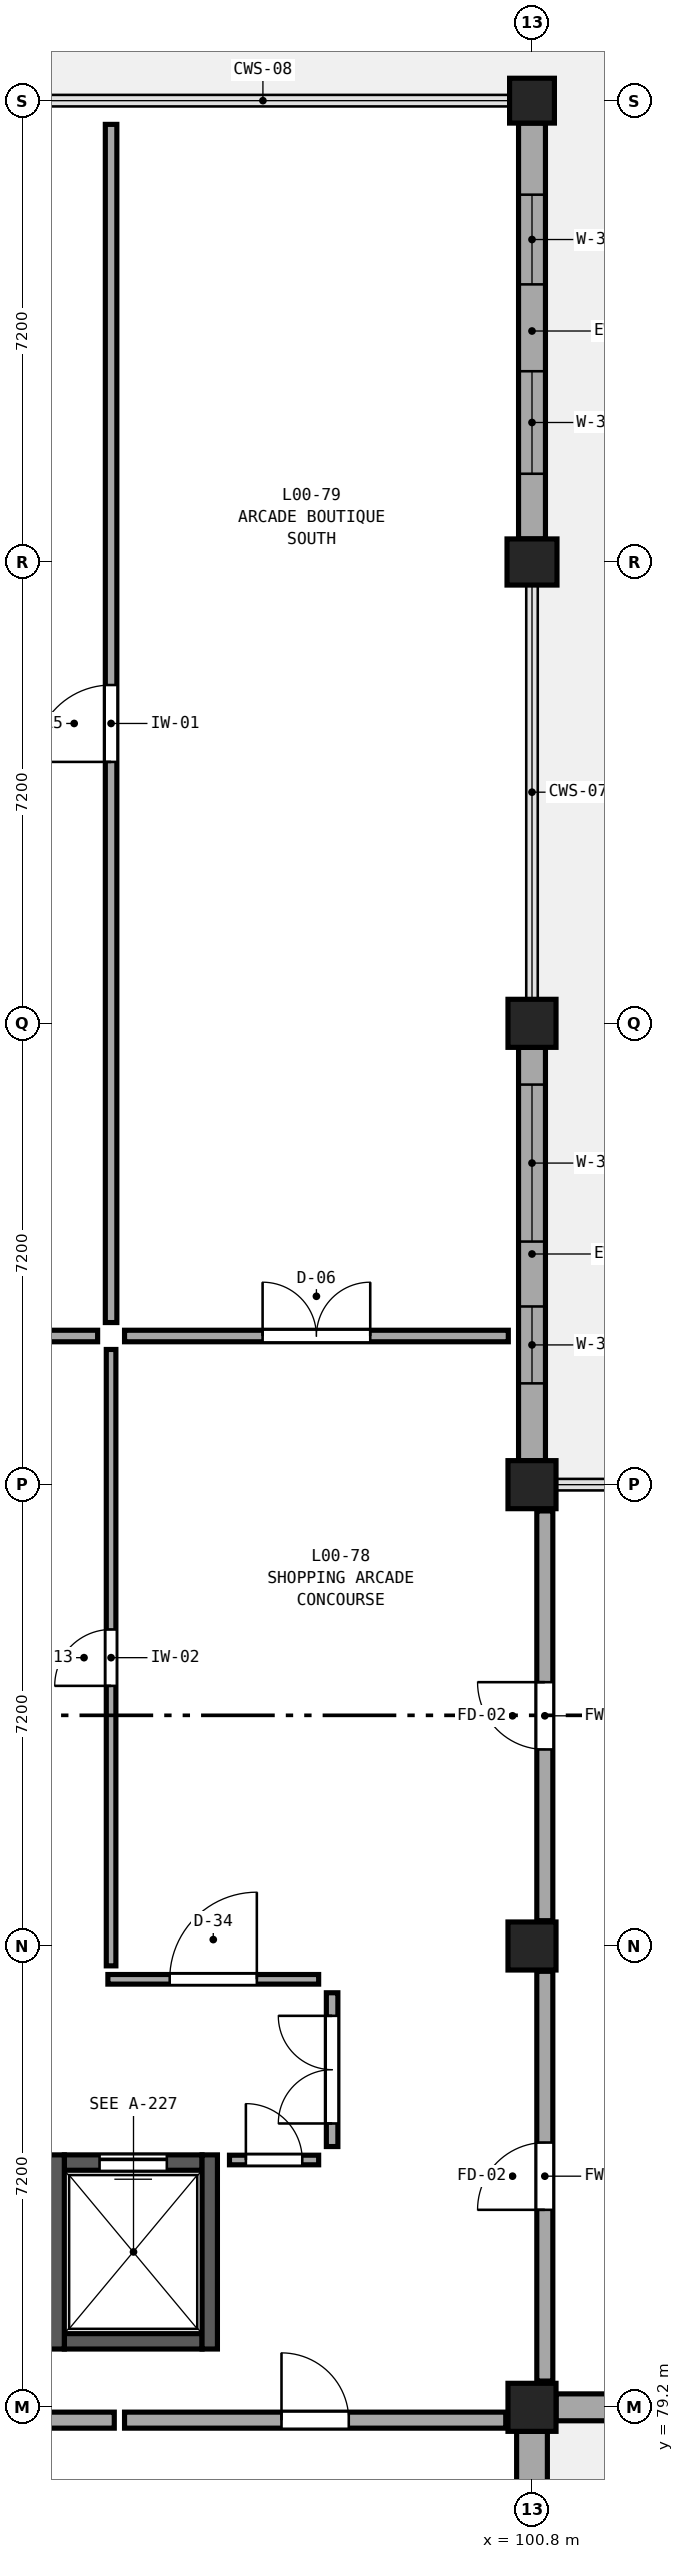
"""IFC4 building model, lengths in metres.
Left out: names, types, materials, properties, quantities, classifications, styles, units other than length and angle.
Written with IfcOpenShell. Run it as: python <this file> out.ifc"""

import sys

from ifc_helpers import new_model, si_unit, direction, frame, frame_2d, origin, origin_2d, place, context, subcontext, project, spatial, rectangle, extrude, element, fill, save


model = new_model("IFC4")
c1 = context("Model", 3, precision=1e-05, world=origin(), true_north=direction((0.0, 1.0)))
c2 = subcontext(c1, "Body", "Model", "MODEL_VIEW")
j1 = project(units=[si_unit("LENGTHUNIT", "METRE"), si_unit("PLANEANGLEUNIT", "RADIAN")], contexts=[c1])
p1 = place(None, origin())
s1 = spatial("IfcSite", under=j1, at=p1, CompositionType="ELEMENT")
p2 = place(p1, origin())
s2 = spatial("IfcBuilding", under=s1, at=p2, CompositionType="ELEMENT")
p3 = place(p2, origin())
s3 = spatial("IfcBuildingStorey", under=s2, at=p3, CompositionType="ELEMENT", Elevation=0.0)
for number, where, z_axis, x_axis in (
    (1, (100.8, 79.2, 0.0), (0.0, 0.0, 1.0), (1.0, 0.0, 0.0)),
    (2, (100.8, 86.4, 0.0), (0.0, 0.0, 1.0), (1.0, 0.0, 0.0)),
    (3, (100.8, 93.6, 0.0), (0.0, 0.0, 1.0), (1.0, 0.0, 0.0)),
    (4, (100.8, 100.8, 0.0), (0.0, 0.0, 1.0), (1.0, 0.0, 0.0)),
):
    element("IfcColumn", number, at=place(p3, frame(where, z_axis=z_axis, x_axis=x_axis)), inside=s3, PredefinedType="COLUMN", context=c2, shape_type="SweptSolid", body=[
        extrude(rectangle(XDim=0.75, YDim=0.75, at=origin_2d()), origin(), (0.0, 0.0, 1.0), 5.4),
    ])
p4 = place(p3, frame((100.8, 108.0, 0.0), z_axis=(0.0, 0.0, 1.0), x_axis=(1.0, 0.0, 0.0)))
e5 = element("IfcColumn", 5, at=p4, inside=s3, PredefinedType="PILASTER", context=c2, shape_type="SweptSolid", body=[
    extrude(rectangle(XDim=0.78, YDim=0.72, at=origin_2d()), origin(), (0.0, 0.0, 1.0), 5.4),
])
p5 = place(p3, frame((100.8, 115.2, 0.0), z_axis=(0.0, 0.0, 1.0), x_axis=(1.0, 0.0, 0.0)))
e6 = element("IfcColumn", 6, at=p5, inside=s3, PredefinedType="COLUMN", context=c2, shape_type="SweptSolid", body=[
    extrude(rectangle(XDim=0.7, YDim=0.7, at=origin_2d()), origin(), (0.0, 0.0, 1.0), 5.4),
])
p6 = place(p3, frame((100.8, 78.825, 0.0), z_axis=(0.0, 0.0, 1.0), x_axis=(0.0, -1.0, 0.0)))
e7 = element("IfcWall", 7, at=p6, inside=s3, PredefinedType="SOLIDWALL", context=c2, shape_type="SweptSolid", body=[
    extrude(rectangle(XDim=6.45, YDim=0.48, at=frame_2d((3.225, 0.0))), origin(), (0.0, 0.0, 1.0), 4.53),
])
p7 = place(p6, frame((1.525, 0.0, 0.0)))
e8 = element("IfcOpeningElement", 8, at=p7, cuts=e7, PredefinedType="OPENING", context=c2, shape_type="SweptSolid", body=[
    extrude(rectangle(XDim=3.4, YDim=3.6, at=frame_2d((1.7, 1.8))), frame((0.0, 0.26, 0.0), z_axis=(0.0, -1.0, 0.0), x_axis=(1.0, 0.0, 0.0)), (0.0, 0.0, 1.0), 0.52),
])
p8 = place(p3, frame((100.8, 100.425, 0.0), z_axis=(0.0, 0.0, 1.0), x_axis=(0.0, -1.0, 0.0)))
e9 = element("IfcWall", 9, at=p8, inside=s3, PredefinedType="SOLIDWALL", context=c2, shape_type="SweptSolid", body=[
    extrude(rectangle(XDim=6.45, YDim=0.42, at=frame_2d((3.225, 0.0))), origin(), (0.0, 0.0, 1.0), 4.53),
])
p9 = place(p8, frame((0.581, 0.0, 0.75)))
e10 = element("IfcOpeningElement", 10, at=p9, cuts=e9, PredefinedType="OPENING", context=c2, shape_type="SweptSolid", body=[
    extrude(rectangle(XDim=2.45, YDim=2.44, at=frame_2d((1.225, 1.22))), frame((0.0, 0.23, 0.0), z_axis=(0.0, -1.0, 0.0), x_axis=(1.0, 0.0, 0.0)), (0.0, 0.0, 1.0), 0.46),
])
p10 = place(p8, frame((4.044, 0.0, 0.75)))
e11 = element("IfcOpeningElement", 11, at=p10, cuts=e9, PredefinedType="OPENING", context=c2, shape_type="SweptSolid", body=[
    extrude(rectangle(XDim=1.2, YDim=2.62, at=frame_2d((0.6, 1.31))), frame((0.0, 0.23, 0.0), z_axis=(0.0, -1.0, 0.0), x_axis=(1.0, 0.0, 0.0)), (0.0, 0.0, 1.0), 0.46),
])
p11 = place(p3, frame((100.8, 114.85, 0.0), z_axis=(0.0, 0.0, 1.0), x_axis=(0.0, -1.0, 0.0)))
e12 = element("IfcWall", 12, at=p11, inside=s3, PredefinedType="SOLIDWALL", context=c2, shape_type="SweptSolid", body=[
    extrude(rectangle(XDim=6.49, YDim=0.42, at=frame_2d((3.245, 0.0))), origin(), (0.0, 0.0, 1.0), 4.53),
])
p12 = place(p11, frame((1.117, 0.0, 0.75)))
e13 = element("IfcOpeningElement", 13, at=p12, cuts=e12, PredefinedType="OPENING", context=c2, shape_type="SweptSolid", body=[
    extrude(rectangle(XDim=1.4, YDim=2.62, at=frame_2d((0.7, 1.31))), frame((0.0, 0.23, 0.0), z_axis=(0.0, -1.0, 0.0), x_axis=(1.0, 0.0, 0.0)), (0.0, 0.0, 1.0), 0.46),
])
p13 = place(p11, frame((3.873, 0.0, 0.75)))
e14 = element("IfcOpeningElement", 14, at=p13, cuts=e12, PredefinedType="OPENING", context=c2, shape_type="SweptSolid", body=[
    extrude(rectangle(XDim=1.6, YDim=2.62, at=frame_2d((0.8, 1.31))), frame((0.0, 0.23, 0.0), z_axis=(0.0, -1.0, 0.0), x_axis=(1.0, 0.0, 0.0)), (0.0, 0.0, 1.0), 0.46),
])
p14 = place(p3, frame((108.8, 79.2, 0.0), z_axis=(0.0, 0.0, 1.0), x_axis=(-1.0, 0.0, 0.0)))
e15 = element("IfcWall", 15, at=p14, inside=s3, PredefinedType="SOLIDWALL", context=c2, shape_type="SweptSolid", body=[
    extrude(rectangle(XDim=7.625, YDim=0.42, at=frame_2d((3.812, 0.0))), origin(), (0.0, 0.0, 1.0), 4.53),
])
p15 = place(p14, frame((1.035, 0.0, 0.75)))
e16 = element("IfcOpeningElement", 16, at=p15, cuts=e15, PredefinedType="OPENING", context=c2, shape_type="SweptSolid", body=[
    extrude(rectangle(XDim=2.2, YDim=2.62, at=frame_2d((1.1, 1.31))), frame((0.0, 0.23, 0.0), z_axis=(0.0, -1.0, 0.0), x_axis=(1.0, 0.0, 0.0)), (0.0, 0.0, 1.0), 0.46),
])
p16 = place(p14, frame((4.29, 0.0, 0.75)))
e17 = element("IfcOpeningElement", 17, at=p16, cuts=e15, PredefinedType="OPENING", context=c2, shape_type="SweptSolid", body=[
    extrude(rectangle(XDim=2.4, YDim=2.62, at=frame_2d((1.2, 1.31))), frame((0.0, 0.23, 0.0), z_axis=(0.0, -1.0, 0.0), x_axis=(1.0, 0.0, 0.0)), (0.0, 0.0, 1.0), 0.46),
])
p17 = place(p3, frame((95.65, 83.02, 0.0), z_axis=(0.0, 0.0, 1.0), x_axis=(-1.0, 0.0, 0.0)))
e18 = element("IfcWall", 18, at=p17, inside=s3, PredefinedType="SHEAR", context=c2, shape_type="SweptSolid", body=[
    extrude(rectangle(XDim=2.15, YDim=0.24, at=frame_2d((1.075, 0.0))), origin(), (0.0, 0.0, 1.0), 6.25),
])
p18 = place(p17, frame((0.55, 0.0, 0.0)))
e19 = element("IfcOpeningElement", 19, at=p18, cuts=e18, PredefinedType="OPENING", context=c2, shape_type="SweptSolid", body=[
    extrude(rectangle(XDim=1.05, YDim=2.2, at=frame_2d((0.525, 1.1))), frame((0.0, 0.14, 0.0), z_axis=(0.0, -1.0, 0.0), x_axis=(1.0, 0.0, 0.0)), (0.0, 0.0, 1.0), 0.28),
])
p19 = place(p3, frame((93.5, 80.23, 0.0), z_axis=(0.0, 0.0, 1.0), x_axis=(1.0, 0.0, 0.0)))
e20 = element("IfcWall", 20, at=p19, inside=s3, PredefinedType="SHEAR", context=c2, shape_type="SweptSolid", body=[
    extrude(rectangle(XDim=2.15, YDim=0.24, at=frame_2d((1.075, 0.0))), origin(), (0.0, 0.0, 1.0), 6.25),
])
for number, where, z_axis, x_axis in (
    (21, (93.38, 83.14, 0.0), (0.0, 0.0, 1.0), (0.0, -1.0, 0.0)),
    (22, (95.77, 80.11, 0.0), (0.0, 0.0, 1.0), (0.0, 1.0, 0.0)),
):
    element("IfcWall", number, at=place(p3, frame(where, z_axis=z_axis, x_axis=x_axis)), inside=s3, PredefinedType="SHEAR", context=c2, shape_type="SweptSolid", body=[
        extrude(rectangle(XDim=3.03, YDim=0.24, at=frame_2d((1.515, 0.0))), origin(), (0.0, 0.0, 1.0), 6.25),
    ])
p20 = place(p3, frame((94.23, 96.13, 0.0), z_axis=(0.0, 0.0, 1.0), x_axis=(0.0, 1.0, 0.0)))
e23 = element("IfcWall", 23, at=p20, inside=s3, PredefinedType="PARTITIONING", context=c2, shape_type="SweptSolid", body=[
    extrude(rectangle(XDim=18.7, YDim=0.18, at=frame_2d((9.35, 0.0))), origin(), (0.0, 0.0, 1.0), 5.08),
])
p21 = place(p20, frame((8.75, 0.0, 0.0)))
e24 = element("IfcOpeningElement", 24, at=p21, cuts=e23, PredefinedType="OPENING", context=c2, shape_type="SweptSolid", body=[
    extrude(rectangle(XDim=1.2, YDim=2.21, at=frame_2d((0.6, 1.105))), frame((0.0, 0.11, 0.0), z_axis=(0.0, -1.0, 0.0), x_axis=(1.0, 0.0, 0.0)), (0.0, 0.0, 1.0), 0.22),
])
p22 = place(p3, frame((101.0, 79.61, 0.0), z_axis=(0.0, 0.0, 1.0), x_axis=(0.0, 1.0, 0.0)))
e25 = element("IfcWall", 25, at=p22, inside=s3, PredefinedType="SOLIDWALL", context=c2, shape_type="SweptSolid", body=[
    extrude(rectangle(XDim=6.395, YDim=0.25, at=frame_2d((3.197, 0.0))), origin(), (0.0, 0.0, 1.0), 4.58),
])
p23 = place(p22, frame((2.673, 0.0, 0.0)))
e26 = element("IfcOpeningElement", 26, at=p23, cuts=e25, PredefinedType="OPENING", context=c2, shape_type="SweptSolid", body=[
    extrude(rectangle(XDim=1.05, YDim=2.15, at=frame_2d((0.525, 1.075))), frame((0.0, 0.145, 0.0), z_axis=(0.0, -1.0, 0.0), x_axis=(1.0, 0.0, 0.0)), (0.0, 0.0, 1.0), 0.29),
])
p24 = place(p3, frame((101.0, 86.795, 0.0), z_axis=(0.0, 0.0, 1.0), x_axis=(0.0, 1.0, 0.0)))
e27 = element("IfcWall", 27, at=p24, inside=s3, PredefinedType="SOLIDWALL", context=c2, shape_type="SweptSolid", body=[
    extrude(rectangle(XDim=6.395, YDim=0.25, at=frame_2d((3.198, 0.0))), origin(), (0.0, 0.0, 1.0), 4.58),
])
p25 = place(p24, frame((2.673, 0.0, 0.0)))
e28 = element("IfcOpeningElement", 28, at=p25, cuts=e27, PredefinedType="OPENING", context=c2, shape_type="SweptSolid", body=[
    extrude(rectangle(XDim=1.05, YDim=2.15, at=frame_2d((0.525, 1.075))), frame((0.0, 0.145, 0.0), z_axis=(0.0, -1.0, 0.0), x_axis=(1.0, 0.0, 0.0)), (0.0, 0.0, 1.0), 0.29),
])
p26 = place(p3, frame((94.23, 86.09, 0.0), z_axis=(0.0, 0.0, 1.0), x_axis=(0.0, 1.0, 0.0)))
e29 = element("IfcWall", 29, at=p26, inside=s3, PredefinedType="PARTITIONING", context=c2, shape_type="SweptSolid", body=[
    extrude(rectangle(XDim=9.62, YDim=0.15, at=frame_2d((4.81, 0.0))), origin(), (0.0, 0.0, 1.0), 5.08),
])
p27 = place(p26, frame((4.37, 0.0, 0.0)))
e30 = element("IfcOpeningElement", 30, at=p27, cuts=e29, PredefinedType="OPENING", context=c2, shape_type="SweptSolid", body=[
    extrude(rectangle(XDim=0.88, YDim=2.21, at=frame_2d((0.44, 1.105))), frame((0.0, 0.095, 0.0), z_axis=(0.0, -1.0, 0.0), x_axis=(1.0, 0.0, 0.0)), (0.0, 0.0, 1.0), 0.19),
])
p28 = place(p3, frame((94.44, 95.92, 0.0), z_axis=(0.0, 0.0, 1.0), x_axis=(1.0, 0.0, 0.0)))
e31 = element("IfcWall", 31, at=p28, inside=s3, PredefinedType="PARTITIONING", context=c2, shape_type="SweptSolid", body=[
    extrude(rectangle(XDim=5.99, YDim=0.18, at=frame_2d((2.995, 0.0))), origin(), (0.0, 0.0, 1.0), 5.08),
])
p29 = place(p28, frame((2.155, 0.0, 0.0)))
e32 = element("IfcOpeningElement", 32, at=p29, cuts=e31, PredefinedType="OPENING", context=c2, shape_type="SweptSolid", body=[
    extrude(rectangle(XDim=1.68, YDim=2.05, at=frame_2d((0.84, 1.025))), frame((0.0, 0.11, 0.0), z_axis=(0.0, -1.0, 0.0), x_axis=(1.0, 0.0, 0.0)), (0.0, 0.0, 1.0), 0.22),
])
p30 = place(p3, frame((94.44, 79.0, 0.0), z_axis=(0.0, 0.0, 1.0), x_axis=(1.0, 0.0, 0.0)))
e33 = element("IfcWall", 33, at=p30, inside=s3, PredefinedType="SOLIDWALL", context=c2, shape_type="SweptSolid", body=[
    extrude(rectangle(XDim=5.95, YDim=0.25, at=frame_2d((2.975, 0.0))), origin(), (0.0, 0.0, 1.0), 4.58),
])
p31 = place(p30, frame((2.45, 0.0, 0.0)))
e34 = element("IfcOpeningElement", 34, at=p31, cuts=e33, PredefinedType="OPENING", context=c2, shape_type="SweptSolid", body=[
    extrude(rectangle(XDim=1.05, YDim=2.15, at=frame_2d((0.525, 1.075))), frame((0.0, 0.145, 0.0), z_axis=(0.0, -1.0, 0.0), x_axis=(1.0, 0.0, 0.0)), (0.0, 0.0, 1.0), 0.29),
])
p32 = place(p3, frame((94.18, 85.88, 0.0), z_axis=(0.0, 0.0, 1.0), x_axis=(1.0, 0.0, 0.0)))
e35 = element("IfcWall", 35, at=p32, inside=s3, PredefinedType="PARTITIONING", context=c2, shape_type="SweptSolid", body=[
    extrude(rectangle(XDim=3.29, YDim=0.15, at=frame_2d((1.645, 0.0))), origin(), (0.0, 0.0, 1.0), 4.58),
])
p33 = place(p32, frame((0.965, 0.0, 0.0)))
e36 = element("IfcOpeningElement", 36, at=p33, cuts=e35, PredefinedType="OPENING", context=c2, shape_type="SweptSolid", body=[
    extrude(rectangle(XDim=1.36, YDim=2.45, at=frame_2d((0.68, 1.225))), frame((0.0, 0.095, 0.0), z_axis=(0.0, -1.0, 0.0), x_axis=(1.0, 0.0, 0.0)), (0.0, 0.0, 1.0), 0.19),
])
p34 = place(p3, frame((97.68, 83.27, 0.0), z_axis=(0.0, 0.0, 1.0), x_axis=(0.0, 1.0, 0.0)))
e37 = element("IfcWall", 37, at=p34, inside=s3, PredefinedType="PARTITIONING", context=c2, shape_type="SweptSolid", body=[
    extrude(rectangle(XDim=2.4, YDim=0.18, at=frame_2d((1.2, 0.0))), origin(), (0.0, 0.0, 1.0), 5.08),
])
p35 = place(p34, frame((0.36, 0.0, 0.0)))
e38 = element("IfcOpeningElement", 38, at=p35, cuts=e37, PredefinedType="OPENING", context=c2, shape_type="SweptSolid", body=[
    extrude(rectangle(XDim=1.68, YDim=2.13, at=frame_2d((0.84, 1.065))), frame((0.0, 0.11, 0.0), z_axis=(0.0, -1.0, 0.0), x_axis=(1.0, 0.0, 0.0)), (0.0, 0.0, 1.0), 0.22),
])
p36 = place(p3, frame((96.078, 83.06, 0.0), z_axis=(0.0, 0.0, 1.0), x_axis=(1.0, 0.0, 0.0)))
e39 = element("IfcWall", 39, at=p36, inside=s3, PredefinedType="PARTITIONING", context=c2, shape_type="SweptSolid", body=[
    extrude(rectangle(XDim=1.392, YDim=0.15, at=frame_2d((0.696, 0.0))), origin(), (0.0, 0.0, 1.0), 5.08),
])
p37 = place(p36, frame((0.256, 0.0, 0.0)))
e40 = element("IfcOpeningElement", 40, at=p37, cuts=e39, PredefinedType="OPENING", context=c2, shape_type="SweptSolid", body=[
    extrude(rectangle(XDim=0.88, YDim=2.05, at=frame_2d((0.44, 1.025))), frame((0.0, 0.095, 0.0), z_axis=(0.0, -1.0, 0.0), x_axis=(1.0, 0.0, 0.0)), (0.0, 0.0, 1.0), 0.19),
])
p38 = place(p3, frame((74.14, 95.92, 0.0), z_axis=(0.0, 0.0, 1.0), x_axis=(1.0, 0.0, 0.0)))
e41 = element("IfcWall", 41, at=p38, inside=s3, PredefinedType="PARTITIONING", context=c2, shape_type="SweptSolid", body=[
    extrude(rectangle(XDim=19.88, YDim=0.18, at=frame_2d((9.94, 0.0))), origin(), (0.0, 0.0, 1.0), 5.08),
])
p39 = place(p3, frame((92.82, 79.0, 0.0), z_axis=(0.0, 0.0, 1.0), x_axis=(1.0, 0.0, 0.0)))
e42 = element("IfcWall", 42, at=p39, inside=s3, PredefinedType="SOLIDWALL", context=c2, shape_type="SweptSolid", body=[
    extrude(rectangle(XDim=1.46, YDim=0.25, at=frame_2d((0.73, 0.0))), origin(), (0.0, 0.0, 1.0), 4.58),
])
p40 = place(p9, origin())
e43 = element("IfcWindow", 43, at=p40, inside=s3, PartitioningType="TRIPLE_PANEL_VERTICAL", PredefinedType="WINDOW", context=c2, shape_type="SweptSolid", body=[
    extrude(rectangle(XDim=2.45, YDim=2.44, at=frame_2d((1.225, 1.22))), frame((0.0, 0.03, 0.0), z_axis=(0.0, -1.0, 0.0), x_axis=(1.0, 0.0, 0.0)), (0.0, 0.0, 1.0), 0.06),
])
fill(e10, e43)
p41 = place(p10, origin())
e44 = element("IfcWindow", 44, at=p41, inside=s3, PartitioningType="SINGLE_PANEL", PredefinedType="WINDOW", context=c2, shape_type="SweptSolid", body=[
    extrude(rectangle(XDim=1.2, YDim=2.62, at=frame_2d((0.6, 1.31))), frame((0.0, 0.03, 0.0), z_axis=(0.0, -1.0, 0.0), x_axis=(1.0, 0.0, 0.0)), (0.0, 0.0, 1.0), 0.06),
])
fill(e11, e44)
p42 = place(p12, origin())
e45 = element("IfcWindow", 45, at=p42, inside=s3, PartitioningType="DOUBLE_PANEL_VERTICAL", PredefinedType="WINDOW", context=c2, shape_type="SweptSolid", body=[
    extrude(rectangle(XDim=1.4, YDim=2.62, at=frame_2d((0.7, 1.31))), frame((0.0, 0.03, 0.0), z_axis=(0.0, -1.0, 0.0), x_axis=(1.0, 0.0, 0.0)), (0.0, 0.0, 1.0), 0.06),
])
fill(e13, e45)
p43 = place(p13, origin())
e46 = element("IfcWindow", 46, at=p43, inside=s3, PartitioningType="DOUBLE_PANEL_VERTICAL", PredefinedType="WINDOW", context=c2, shape_type="SweptSolid", body=[
    extrude(rectangle(XDim=1.6, YDim=2.62, at=frame_2d((0.8, 1.31))), frame((0.0, 0.03, 0.0), z_axis=(0.0, -1.0, 0.0), x_axis=(1.0, 0.0, 0.0)), (0.0, 0.0, 1.0), 0.06),
])
fill(e14, e46)
p44 = place(p18, origin())
e47 = element("IfcDoor", 47, at=p44, inside=s3, OperationType="SLIDING_TO_RIGHT", PredefinedType="DOOR", context=c2, shape_type="SweptSolid", body=[
    extrude(rectangle(XDim=1.05, YDim=2.2, at=frame_2d((0.525, 1.1))), frame((0.0, 0.025, 0.0), z_axis=(0.0, -1.0, 0.0), x_axis=(1.0, 0.0, 0.0)), (0.0, 0.0, 1.0), 0.05),
])
fill(e19, e47)
p45 = place(p21, origin())
e48 = element("IfcDoor", 48, at=p45, inside=s3, OperationType="SINGLE_SWING_LEFT", PredefinedType="DOOR", context=c2, shape_type="SweptSolid", body=[
    extrude(rectangle(XDim=1.2, YDim=2.21, at=frame_2d((0.6, 1.105))), frame((0.0, 0.025, 0.0), z_axis=(0.0, -1.0, 0.0), x_axis=(1.0, 0.0, 0.0)), (0.0, 0.0, 1.0), 0.05),
])
fill(e24, e48)
p46 = place(p23, origin())
e49 = element("IfcDoor", 49, at=p46, inside=s3, OperationType="SINGLE_SWING_LEFT", PredefinedType="DOOR", context=c2, shape_type="SweptSolid", body=[
    extrude(rectangle(XDim=1.05, YDim=2.15, at=frame_2d((0.525, 1.075))), frame((0.0, 0.025, 0.0), z_axis=(0.0, -1.0, 0.0), x_axis=(1.0, 0.0, 0.0)), (0.0, 0.0, 1.0), 0.05),
])
fill(e26, e49)
p47 = place(p25, origin())
e50 = element("IfcDoor", 50, at=p47, inside=s3, OperationType="SINGLE_SWING_RIGHT", PredefinedType="DOOR", context=c2, shape_type="SweptSolid", body=[
    extrude(rectangle(XDim=1.05, YDim=2.15, at=frame_2d((0.525, 1.075))), frame((0.0, 0.025, 0.0), z_axis=(0.0, -1.0, 0.0), x_axis=(1.0, 0.0, 0.0)), (0.0, 0.0, 1.0), 0.05),
])
fill(e28, e50)
p48 = place(p27, origin())
e51 = element("IfcDoor", 51, at=p48, inside=s3, OperationType="SINGLE_SWING_LEFT", PredefinedType="DOOR", context=c2, shape_type="SweptSolid", body=[
    extrude(rectangle(XDim=0.88, YDim=2.21, at=frame_2d((0.44, 1.105))), frame((0.0, 0.025, 0.0), z_axis=(0.0, -1.0, 0.0), x_axis=(1.0, 0.0, 0.0)), (0.0, 0.0, 1.0), 0.05),
])
fill(e30, e51)
p49 = place(p29, origin())
e52 = element("IfcDoor", 52, at=p49, inside=s3, OperationType="DOUBLE_DOOR_SINGLE_SWING", PredefinedType="DOOR", context=c2, shape_type="SweptSolid", body=[
    extrude(rectangle(XDim=1.68, YDim=2.05, at=frame_2d((0.84, 1.025))), frame((0.0, 0.025, 0.0), z_axis=(0.0, -1.0, 0.0), x_axis=(1.0, 0.0, 0.0)), (0.0, 0.0, 1.0), 0.05),
])
fill(e32, e52)
p50 = place(p31, origin())
e53 = element("IfcDoor", 53, at=p50, inside=s3, OperationType="SINGLE_SWING_LEFT", PredefinedType="DOOR", context=c2, shape_type="SweptSolid", body=[
    extrude(rectangle(XDim=1.05, YDim=2.15, at=frame_2d((0.525, 1.075))), frame((0.0, 0.025, 0.0), z_axis=(0.0, -1.0, 0.0), x_axis=(1.0, 0.0, 0.0)), (0.0, 0.0, 1.0), 0.05),
])
fill(e34, e53)
p51 = place(p33, origin())
e54 = element("IfcDoor", 54, at=p51, inside=s3, OperationType="SINGLE_SWING_RIGHT", PredefinedType="DOOR", context=c2, shape_type="SweptSolid", body=[
    extrude(rectangle(XDim=1.36, YDim=2.45, at=frame_2d((0.68, 1.225))), frame((0.0, 0.025, 0.0), z_axis=(0.0, -1.0, 0.0), x_axis=(1.0, 0.0, 0.0)), (0.0, 0.0, 1.0), 0.05),
])
fill(e36, e54)
p52 = place(p35, origin())
e55 = element("IfcDoor", 55, at=p52, inside=s3, OperationType="DOUBLE_DOOR_SINGLE_SWING", PredefinedType="DOOR", context=c2, shape_type="SweptSolid", body=[
    extrude(rectangle(XDim=1.68, YDim=2.13, at=frame_2d((0.84, 1.065))), frame((0.0, 0.025, 0.0), z_axis=(0.0, -1.0, 0.0), x_axis=(1.0, 0.0, 0.0)), (0.0, 0.0, 1.0), 0.05),
])
fill(e38, e55)
p53 = place(p37, origin())
e56 = element("IfcDoor", 56, at=p53, inside=s3, OperationType="SINGLE_SWING_LEFT", PredefinedType="DOOR", context=c2, shape_type="SweptSolid", body=[
    extrude(rectangle(XDim=0.88, YDim=2.05, at=frame_2d((0.44, 1.025))), frame((0.0, 0.025, 0.0), z_axis=(0.0, -1.0, 0.0), x_axis=(1.0, 0.0, 0.0)), (0.0, 0.0, 1.0), 0.05),
])
fill(e40, e56)
save(model, sys.argv[1])
